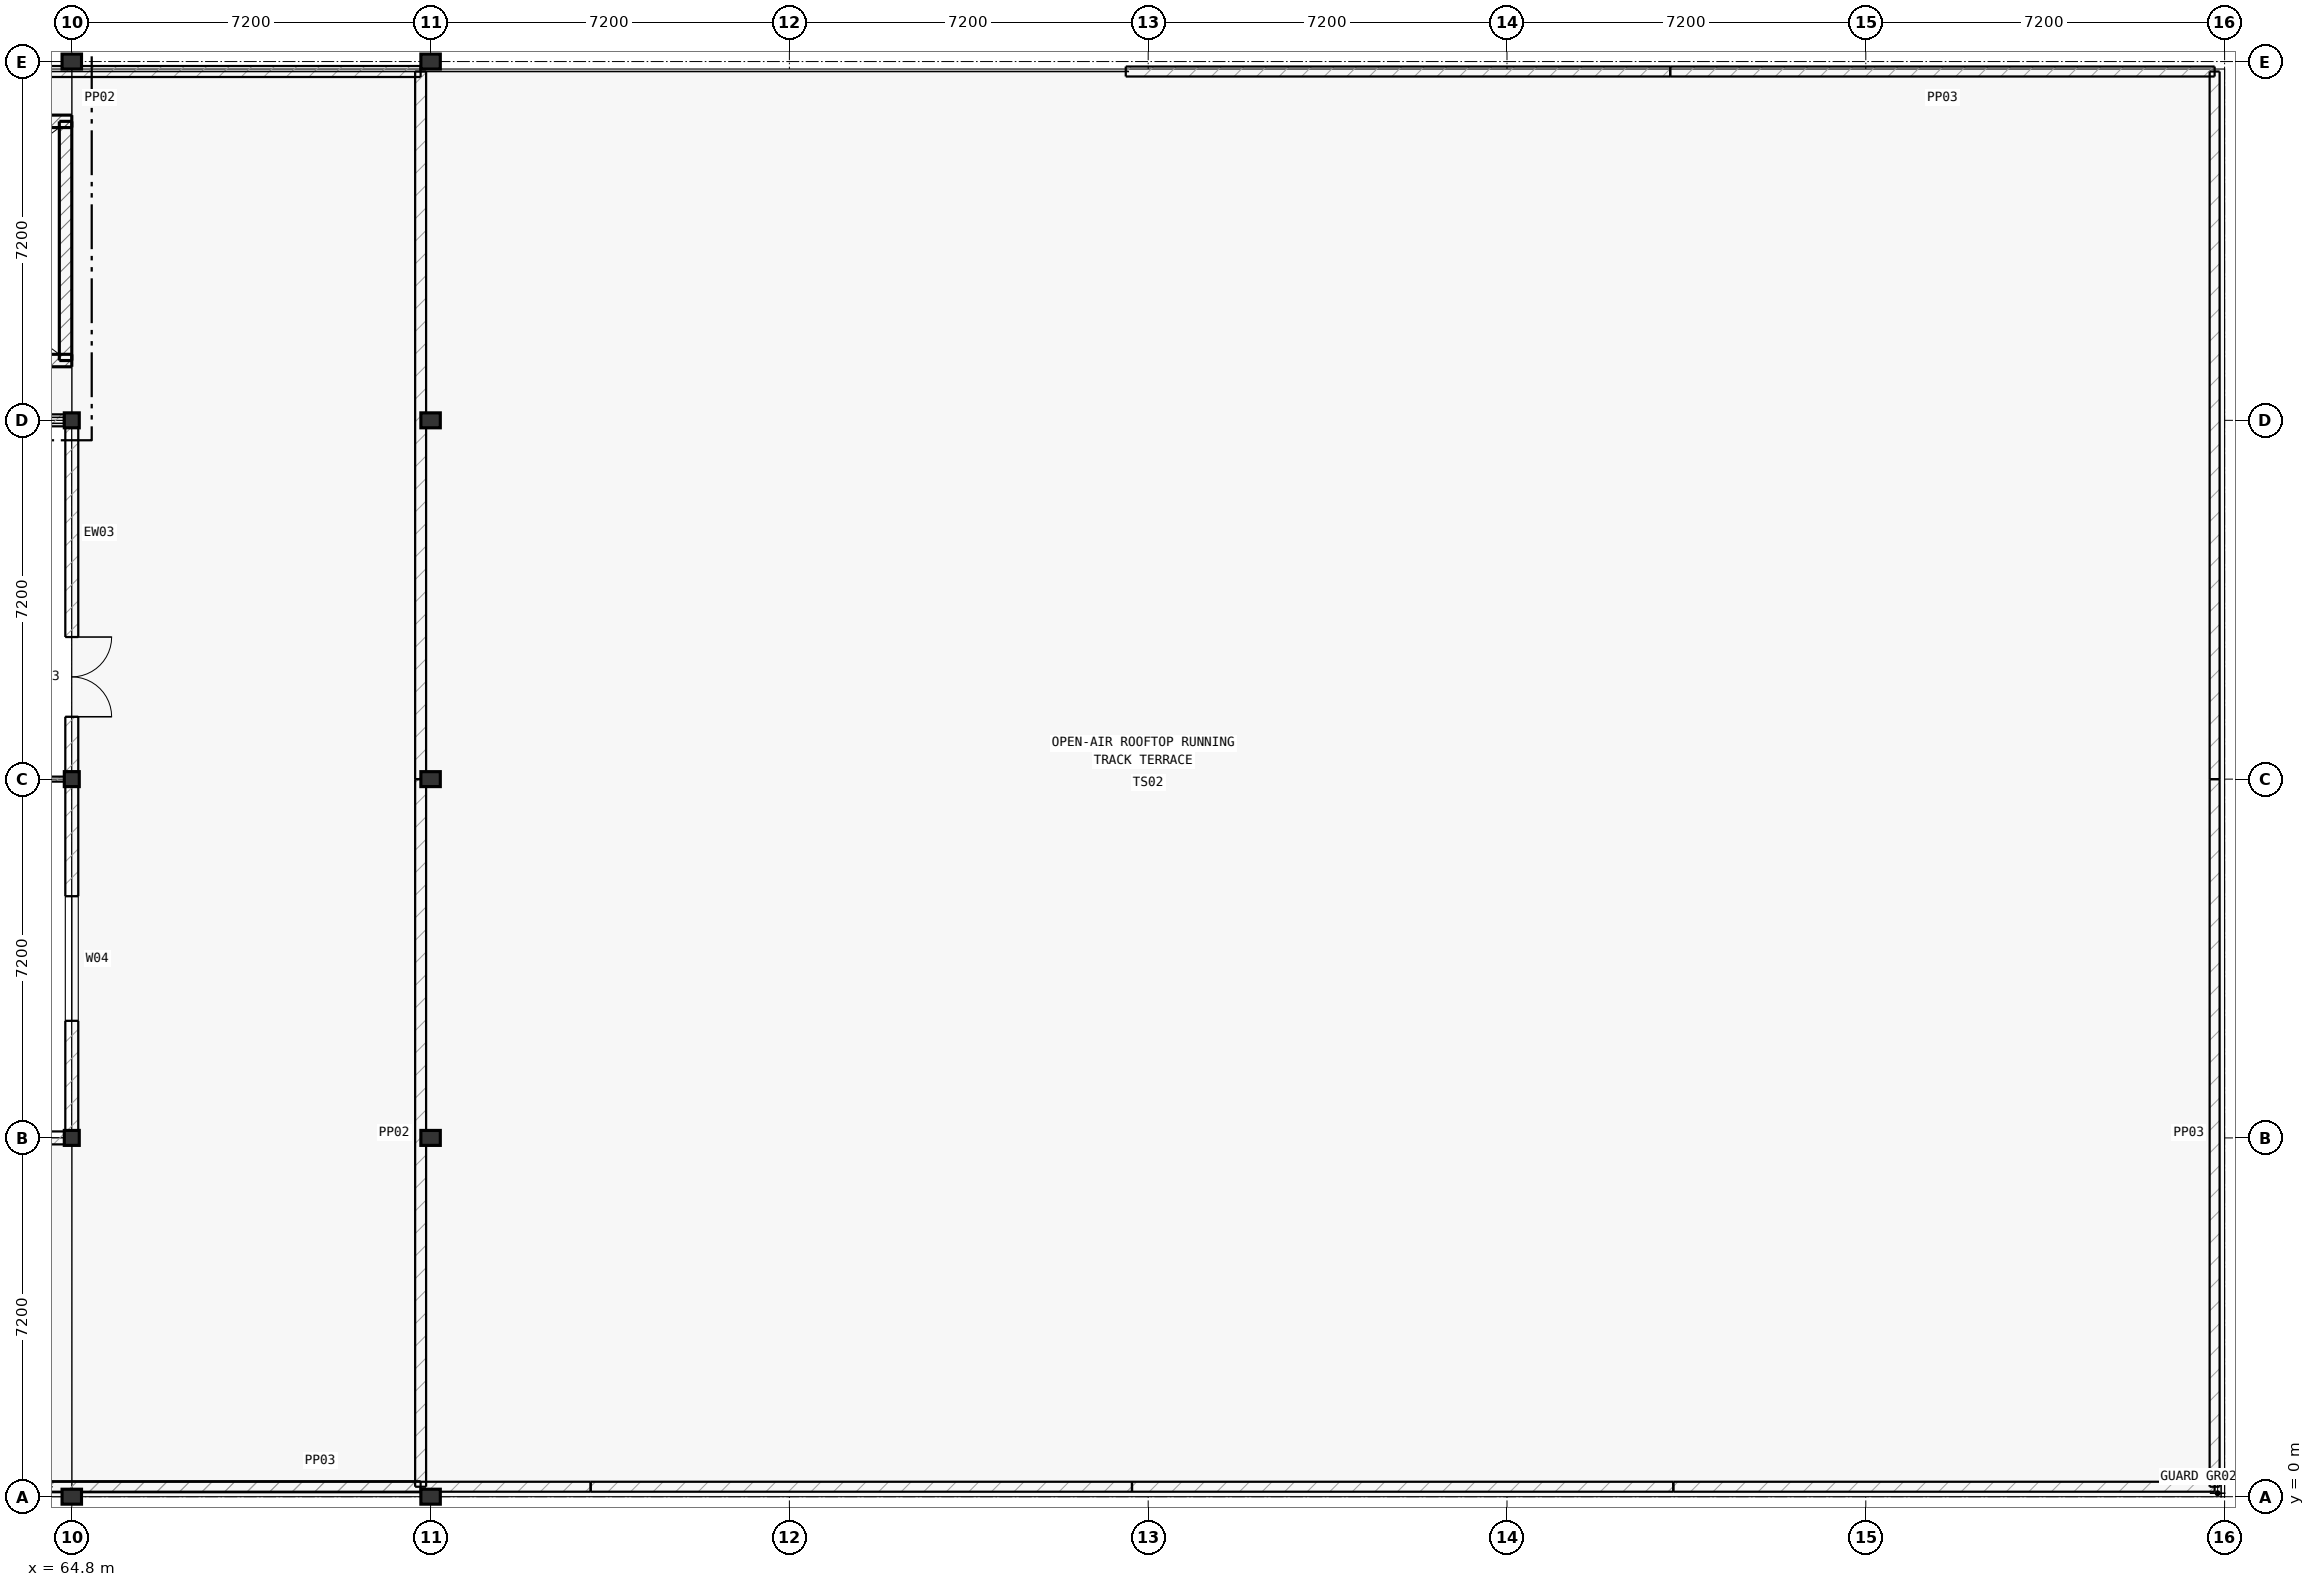
"""IFC4 building model, lengths in metres.
Left out: names, types, materials, properties, quantities, classifications, styles, units other than length and angle.
Written with IfcOpenShell. Run it as: python <this file> out.ifc"""

import sys

from ifc_helpers import new_model, si_unit, direction, frame, frame_2d, origin, origin_2d, place, context, subcontext, project, spatial, rectangle, hollow_rectangle, i_section, extrude, element, fill, save


model = new_model("IFC4")
c1 = context("Model", 3, precision=1e-05, world=origin(), true_north=direction((0.0, 1.0)))
c2 = subcontext(c1, "Body", "Model", "MODEL_VIEW")
j1 = project(units=[si_unit("LENGTHUNIT", "METRE"), si_unit("PLANEANGLEUNIT", "RADIAN")], contexts=[c1])
p1 = place(None, origin())
s1 = spatial("IfcSite", under=j1, at=p1, CompositionType="ELEMENT")
p2 = place(p1, origin())
s2 = spatial("IfcBuilding", under=s1, at=p2, CompositionType="ELEMENT")
p3 = place(p2, frame((0.0, 0.0, 20.4)))
s3 = spatial("IfcBuildingStorey", under=s2, at=p3, CompositionType="ELEMENT", Elevation=20.4)
p4 = place(p3, frame((64.8, 0.0, 0.0), z_axis=(0.0, 0.0, 1.0), x_axis=(1.0, 0.0, 0.0)))
e1 = element("IfcColumn", 1, at=p4, inside=s3, PredefinedType="COLUMN", context=c2, shape_type="SweptSolid", body=[
    extrude(i_section(OverallWidth=0.3, OverallDepth=0.39, WebThickness=0.011, FlangeThickness=0.019, at=origin_2d()), origin(), (0.0, 0.0, 1.0), 4.4),
])
for number, where, z_axis, x_axis in (
    (2, (64.8, 7.2, 0.0), (0.0, 0.0, 1.0), (1.0, 0.0, 0.0)),
    (3, (64.8, 14.4, 0.0), (0.0, 0.0, 1.0), (1.0, 0.0, 0.0)),
    (4, (64.8, 21.6, 0.0), (0.0, 0.0, 1.0), (1.0, 0.0, 0.0)),
):
    element("IfcColumn", number, at=place(p3, frame(where, z_axis=z_axis, x_axis=x_axis)), inside=s3, PredefinedType="COLUMN", context=c2, shape_type="SweptSolid", body=[
        extrude(hollow_rectangle(XDim=0.3, YDim=0.3, WallThickness=0.012, at=origin_2d()), origin(), (0.0, 0.0, 1.0), 4.17),
    ])
for number, where, z_axis, x_axis in (
    (5, (64.8, 28.8, 0.0), (0.0, 0.0, 1.0), (1.0, 0.0, 0.0)),
    (6, (72.0, 0.0, 0.0), (0.0, 0.0, 1.0), (1.0, 0.0, 0.0)),
    (7, (72.0, 7.2, 0.0), (0.0, 0.0, 1.0), (1.0, 0.0, 0.0)),
    (8, (72.0, 14.4, 0.0), (0.0, 0.0, 1.0), (1.0, 0.0, 0.0)),
    (9, (72.0, 21.6, 0.0), (0.0, 0.0, 1.0), (1.0, 0.0, 0.0)),
    (10, (72.0, 28.8, 0.0), (0.0, 0.0, 1.0), (1.0, 0.0, 0.0)),
):
    element("IfcColumn", number, at=place(p3, frame(where, z_axis=z_axis, x_axis=x_axis)), inside=s3, PredefinedType="COLUMN", context=c2, shape_type="SweptSolid", body=[
        extrude(i_section(OverallWidth=0.3, OverallDepth=0.39, WebThickness=0.011, FlangeThickness=0.019, at=origin_2d()), origin(), (0.0, 0.0, 1.0), 4.4),
    ])
p5 = place(p3, frame((57.835, 21.6, 0.0), z_axis=(0.0, 0.0, 1.0), x_axis=(1.0, 0.0, 0.0)))
e11 = element("IfcWall", 11, at=p5, inside=s3, PredefinedType="SOLIDWALL", context=c2, shape_type="SweptSolid", body=[
    extrude(rectangle(XDim=6.817, YDim=0.24, at=frame_2d((3.408, 0.0))), origin(), (0.0, 0.0, 1.0), 0.3),
])
p6 = place(p3, frame((64.652, 7.2, 0.0), z_axis=(0.0, 0.0, 1.0), x_axis=(-1.0, 0.0, 0.0)))
e12 = element("IfcWall", 12, at=p6, inside=s3, PredefinedType="SOLIDWALL", context=c2, shape_type="SweptSolid", body=[
    extrude(rectangle(XDim=6.817, YDim=0.26, at=frame_2d((3.408, 0.0))), origin(), (0.0, 0.0, 1.0), 3.655),
])
p7 = place(p6, frame((2.158, 0.0, 0.85)))
e13 = element("IfcOpeningElement", 13, at=p7, cuts=e12, PredefinedType="OPENING", context=c2, shape_type="SweptSolid", body=[
    extrude(rectangle(XDim=2.5, YDim=2.2, at=frame_2d((1.25, 1.1))), frame((0.0, 0.14, 0.0), z_axis=(0.0, -1.0, 0.0), x_axis=(1.0, 0.0, 0.0)), (0.0, 0.0, 1.0), 0.28),
])
p8 = place(p3, frame((64.8, 21.451, 0.0), z_axis=(0.0, 0.0, 1.0), x_axis=(0.0, -1.0, 0.0)))
e14 = element("IfcWall", 14, at=p8, inside=s3, PredefinedType="SOLIDWALL", context=c2, shape_type="SweptSolid", body=[
    extrude(rectangle(XDim=6.903, YDim=0.26, at=frame_2d((3.451, 0.0))), origin(), (0.0, 0.0, 1.0), 3.655),
])
p9 = place(p8, frame((4.2, 0.0, 0.0)))
e15 = element("IfcOpeningElement", 15, at=p9, cuts=e14, PredefinedType="OPENING", context=c2, shape_type="SweptSolid", body=[
    extrude(rectangle(XDim=1.6, YDim=2.3, at=frame_2d((0.8, 1.15))), frame((0.0, 0.14, 0.0), z_axis=(0.0, -1.0, 0.0), x_axis=(1.0, 0.0, 0.0)), (0.0, 0.0, 1.0), 0.28),
])
p10 = place(p3, frame((64.8, 14.251, 0.0), z_axis=(0.0, 0.0, 1.0), x_axis=(0.0, -1.0, 0.0)))
e16 = element("IfcWall", 16, at=p10, inside=s3, PredefinedType="SOLIDWALL", context=c2, shape_type="SweptSolid", body=[
    extrude(rectangle(XDim=6.903, YDim=0.26, at=frame_2d((3.452, 0.0))), origin(), (0.0, 0.0, 1.0), 3.655),
])
p11 = place(p10, frame((2.201, 0.0, 0.85)))
e17 = element("IfcOpeningElement", 17, at=p11, cuts=e16, PredefinedType="OPENING", context=c2, shape_type="SweptSolid", body=[
    extrude(rectangle(XDim=2.5, YDim=2.2, at=frame_2d((1.25, 1.1))), frame((0.0, 0.14, 0.0), z_axis=(0.0, -1.0, 0.0), x_axis=(1.0, 0.0, 0.0)), (0.0, 0.0, 1.0), 0.28),
])
p12 = place(p3, frame((64.35, 0.2, 0.0), z_axis=(0.0, 0.0, 1.0), x_axis=(1.0, 0.0, 0.0)))
e18 = element("IfcWall", 18, at=p12, inside=s3, PredefinedType="PARAPET", context=c2, shape_type="SweptSolid", body=[
    extrude(rectangle(XDim=10.862, YDim=0.2, at=frame_2d((5.431, 0.0))), origin(), (0.0, 0.0, 1.0), 1.15),
])
for number, where, z_axis, x_axis in (
    (19, (75.212, 0.2, 0.0), (0.0, 0.0, 1.0), (1.0, 0.0, 0.0)),
    (20, (86.075, 0.2, 0.0), (0.0, 0.0, 1.0), (1.0, 0.0, 0.0)),
    (21, (96.938, 0.2, 0.0), (0.0, 0.0, 1.0), (1.0, 0.0, 0.0)),
):
    element("IfcWall", number, at=place(p3, frame(where, z_axis=z_axis, x_axis=x_axis)), inside=s3, PredefinedType="PARAPET", context=c2, shape_type="SweptSolid", body=[
        extrude(rectangle(XDim=10.863, YDim=0.2, at=frame_2d((5.431, 0.0))), origin(), (0.0, 0.0, 1.0), 1.15),
    ])
p13 = place(p3, frame((107.8, 0.2, 0.0), z_axis=(0.0, 0.0, 1.0), x_axis=(0.0, 1.0, 0.0)))
e22 = element("IfcWall", 22, at=p13, inside=s3, PredefinedType="PARAPET", context=c2, shape_type="SweptSolid", body=[
    extrude(rectangle(XDim=14.2, YDim=0.2, at=frame_2d((7.1, 0.0))), origin(), (0.0, 0.0, 1.0), 1.15),
])
p14 = place(p3, frame((107.8, 14.4, 0.0), z_axis=(0.0, 0.0, 1.0), x_axis=(0.0, 1.0, 0.0)))
e23 = element("IfcWall", 23, at=p14, inside=s3, PredefinedType="PARAPET", context=c2, shape_type="SweptSolid", body=[
    extrude(rectangle(XDim=14.2, YDim=0.2, at=frame_2d((7.1, 0.0))), origin(), (0.0, 0.0, 1.0), 1.15),
])
for number, where, z_axis, x_axis in (
    (24, (107.8, 28.6, 0.0), (0.0, 0.0, 1.0), (-1.0, 0.0, 0.0)),
    (25, (96.875, 28.6, 0.0), (0.0, 0.0, 1.0), (-1.0, 0.0, 0.0)),
):
    element("IfcWall", number, at=place(p3, frame(where, z_axis=z_axis, x_axis=x_axis)), inside=s3, PredefinedType="PARAPET", context=c2, shape_type="SweptSolid", body=[
        extrude(rectangle(XDim=10.925, YDim=0.2, at=frame_2d((5.462, 0.0))), origin(), (0.0, 0.0, 1.0), 1.15),
    ])
p15 = place(p3, frame((58.92, 0.2, 4.4), z_axis=(0.0, 0.0, 1.0), x_axis=(1.0, 0.0, 0.0)))
e26 = element("IfcWall", 26, at=p15, inside=s3, PredefinedType="PARAPET", context=c2, shape_type="SweptSolid", body=[
    extrude(rectangle(XDim=12.88, YDim=0.22, at=frame_2d((6.44, 0.0))), origin(), (0.0, 0.0, 1.0), 1.15),
])
p16 = place(p3, frame((71.8, 0.2, 4.4), z_axis=(0.0, 0.0, 1.0), x_axis=(0.0, 1.0, 0.0)))
e27 = element("IfcWall", 27, at=p16, inside=s3, PredefinedType="PARAPET", context=c2, shape_type="SweptSolid", body=[
    extrude(rectangle(XDim=14.2, YDim=0.22, at=frame_2d((7.1, 0.0))), origin(), (0.0, 0.0, 1.0), 1.15),
])
p17 = place(p3, frame((71.8, 14.4, 4.4), z_axis=(0.0, 0.0, 1.0), x_axis=(0.0, 1.0, 0.0)))
e28 = element("IfcWall", 28, at=p17, inside=s3, PredefinedType="PARAPET", context=c2, shape_type="SweptSolid", body=[
    extrude(rectangle(XDim=14.2, YDim=0.22, at=frame_2d((7.1, 0.0))), origin(), (0.0, 0.0, 1.0), 1.15),
])
p18 = place(p3, frame((71.8, 28.6, 4.4), z_axis=(0.0, 0.0, 1.0), x_axis=(-1.0, 0.0, 0.0)))
e29 = element("IfcWall", 29, at=p18, inside=s3, PredefinedType="PARAPET", context=c2, shape_type="SweptSolid", body=[
    extrude(rectangle(XDim=12.88, YDim=0.22, at=frame_2d((6.44, 0.0))), origin(), (0.0, 0.0, 1.0), 1.15),
])
p19 = place(p3, frame((57.15, 27.6, 0.0), z_axis=(0.0, 0.0, 1.0), x_axis=(1.0, 0.0, 0.0)))
e30 = element("IfcWall", 30, at=p19, inside=s3, PredefinedType="SHEAR", context=c2, shape_type="SweptSolid", body=[
    extrude(rectangle(XDim=7.65, YDim=0.25, at=frame_2d((3.825, 0.0))), origin(), (0.0, 0.0, 1.0), 4.04),
])
p20 = place(p3, frame((64.675, 27.6, 0.0), z_axis=(0.0, 0.0, 1.0), x_axis=(0.0, -1.0, 0.0)))
e31 = element("IfcWall", 31, at=p20, inside=s3, PredefinedType="SHEAR", context=c2, shape_type="SweptSolid", body=[
    extrude(rectangle(XDim=4.8, YDim=0.25, at=frame_2d((2.4, 0.0))), origin(), (0.0, 0.0, 1.0), 4.04),
])
p21 = place(p3, frame((64.8, 22.8, 0.0), z_axis=(0.0, 0.0, 1.0), x_axis=(-1.0, 0.0, 0.0)))
e32 = element("IfcWall", 32, at=p21, inside=s3, PredefinedType="SHEAR", context=c2, shape_type="SweptSolid", body=[
    extrude(rectangle(XDim=7.65, YDim=0.25, at=frame_2d((3.825, 0.0))), origin(), (0.0, 0.0, 1.0), 4.04),
])
p22 = place(p3, frame((57.85, 14.4, 0.0), z_axis=(0.0, 0.0, 1.0), x_axis=(1.0, 0.0, 0.0)))
e33 = element("IfcWall", 33, at=p22, inside=s3, PredefinedType="PARTITIONING", context=c2, shape_type="SweptSolid", body=[
    extrude(rectangle(XDim=6.8, YDim=0.1, at=frame_2d((3.4, 0.0))), origin(), (0.0, 0.0, 1.0), 3.6),
])
p23 = place(p9, origin())
e34 = element("IfcDoor", 34, at=p23, inside=s3, OperationType="DOUBLE_DOOR_SINGLE_SWING", PredefinedType="DOOR", context=c2, shape_type="SweptSolid", body=[
    extrude(rectangle(XDim=1.6, YDim=2.3, at=frame_2d((0.8, 1.15))), frame((0.0, 0.025, 0.0), z_axis=(0.0, -1.0, 0.0), x_axis=(1.0, 0.0, 0.0)), (0.0, 0.0, 1.0), 0.05),
])
fill(e15, e34)
p24 = place(p11, origin())
e35 = element("IfcWindow", 35, at=p24, inside=s3, PartitioningType="SINGLE_PANEL", PredefinedType="WINDOW", context=c2, shape_type="SweptSolid", body=[
    extrude(rectangle(XDim=2.5, YDim=2.2, at=frame_2d((1.25, 1.1))), frame((0.0, 0.03, 0.0), z_axis=(0.0, -1.0, 0.0), x_axis=(1.0, 0.0, 0.0)), (0.0, 0.0, 1.0), 0.06),
])
fill(e17, e35)
save(model, sys.argv[1])
